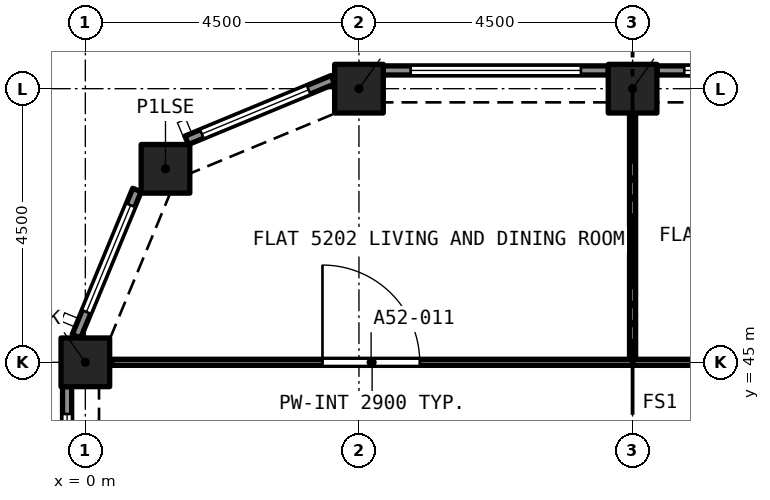
"""IFC4 building model, lengths in metres.
Left out: names, types, materials, properties, quantities, classifications, styles, units other than length and angle.
Written with IfcOpenShell. Run it as: python <this file> out.ifc"""

import sys

from ifc_helpers import new_model, si_unit, direction, frame, frame_2d, origin, origin_2d, place, context, subcontext, project, spatial, rectangle, extrude, element, fill, save


model = new_model("IFC4")
c1 = context("Model", 3, precision=1e-05, world=origin(), true_north=direction((0.0, 1.0)))
c2 = subcontext(c1, "Body", "Model", "MODEL_VIEW")
j1 = project(units=[si_unit("LENGTHUNIT", "METRE"), si_unit("PLANEANGLEUNIT", "RADIAN")], contexts=[c1])
p1 = place(None, origin())
s1 = spatial("IfcSite", under=j1, at=p1, CompositionType="ELEMENT")
p2 = place(p1, origin())
s2 = spatial("IfcBuilding", under=s1, at=p2, CompositionType="ELEMENT")
p3 = place(p2, frame((0.0, 0.0, 189.1)))
s3 = spatial("IfcBuildingStorey", under=s2, at=p3, CompositionType="ELEMENT", Elevation=189.1)
for number, where, z_axis, x_axis in (
    (1, (0.0, 45.0, 0.0), (0.0, 0.0, 1.0), (1.0, 0.0, 0.0)),
    (2, (1.318, 48.182, 0.0), (0.0, 0.0, 1.0), (1.0, 0.0, 0.0)),
    (3, (4.5, 49.5, 0.0), (0.0, 0.0, 1.0), (1.0, 0.0, 0.0)),
    (4, (9.0, 49.5, 0.0), (0.0, 0.0, 1.0), (1.0, 0.0, 0.0)),
):
    element("IfcColumn", number, at=place(p3, frame(where, z_axis=z_axis, x_axis=x_axis)), inside=s3, PredefinedType="COLUMN", context=c2, shape_type="SweptSolid", body=[
        extrude(rectangle(XDim=0.8, YDim=0.8, at=origin_2d()), origin(), (0.0, 0.0, 1.0), 3.2),
    ])
p4 = place(p3, frame((9.4, 49.8, 0.0), z_axis=(0.0, 0.0, 1.0), x_axis=(1.0, 0.0, 0.0)))
e5 = element("IfcWall", 5, at=p4, inside=s3, PredefinedType="SOLIDWALL", context=c2, shape_type="SweptSolid", body=[
    extrude(rectangle(XDim=3.7, YDim=0.15, at=frame_2d((1.85, 0.0))), origin(), (0.0, 0.0, 1.0), 3.2),
])
p5 = place(p4, frame((0.45, 0.0, 0.45)))
e6 = element("IfcOpeningElement", 6, at=p5, cuts=e5, PredefinedType="OPENING", context=c2, shape_type="SweptSolid", body=[
    extrude(rectangle(XDim=2.8, YDim=1.95, at=frame_2d((1.4, 0.975))), frame((0.0, 0.085, 0.0), z_axis=(0.0, -1.0, 0.0), x_axis=(1.0, 0.0, 0.0)), (0.0, 0.0, 1.0), 0.17),
])
p6 = place(p3, frame((4.9, 49.8, 0.0), z_axis=(0.0, 0.0, 1.0), x_axis=(1.0, 0.0, 0.0)))
e7 = element("IfcWall", 7, at=p6, inside=s3, PredefinedType="SOLIDWALL", context=c2, shape_type="SweptSolid", body=[
    extrude(rectangle(XDim=3.7, YDim=0.15, at=frame_2d((1.85, 0.0))), origin(), (0.0, 0.0, 1.0), 3.2),
])
p7 = place(p6, frame((0.45, 0.0, 0.45)))
e8 = element("IfcOpeningElement", 8, at=p7, cuts=e7, PredefinedType="OPENING", context=c2, shape_type="SweptSolid", body=[
    extrude(rectangle(XDim=2.8, YDim=1.95, at=frame_2d((1.4, 0.975))), frame((0.0, 0.085, 0.0), z_axis=(0.0, -1.0, 0.0), x_axis=(1.0, 0.0, 0.0)), (0.0, 0.0, 1.0), 0.17),
])
p8 = place(p3, frame((1.667, 48.651, 0.0), z_axis=(0.0, 0.0, 1.0), x_axis=(0.923885342263, 0.382669406082, 0.0)))
e9 = element("IfcWall", 9, at=p8, inside=s3, PredefinedType="SOLIDWALL", context=c2, shape_type="SweptSolid", body=[
    extrude(rectangle(XDim=2.602, YDim=0.15, at=frame_2d((1.301, 0.0))), origin(), (0.0, 0.0, 1.0), 3.2),
])
p9 = place(p8, frame((0.27, 0.0, 0.45)))
e10 = element("IfcOpeningElement", 10, at=p9, cuts=e9, PredefinedType="OPENING", context=c2, shape_type="SweptSolid", body=[
    extrude(rectangle(XDim=1.9, YDim=1.95, at=frame_2d((0.95, 0.975))), frame((0.0, 0.085, 0.0), z_axis=(0.0, -1.0, 0.0), x_axis=(1.0, 0.0, 0.0)), (0.0, 0.0, 1.0), 0.17),
])
p10 = place(p3, frame((-0.147, 45.429, 0.0), z_axis=(0.0, 0.0, 1.0), x_axis=(0.382669406082, 0.923885342263, 0.0)))
e11 = element("IfcWall", 11, at=p10, inside=s3, PredefinedType="SOLIDWALL", context=c2, shape_type="SweptSolid", body=[
    extrude(rectangle(XDim=2.602, YDim=0.15, at=frame_2d((1.301, 0.0))), origin(), (0.0, 0.0, 1.0), 3.2),
])
p11 = place(p10, frame((0.432, 0.0, 0.45)))
e12 = element("IfcOpeningElement", 12, at=p11, cuts=e11, PredefinedType="OPENING", context=c2, shape_type="SweptSolid", body=[
    extrude(rectangle(XDim=1.9, YDim=1.95, at=frame_2d((0.95, 0.975))), frame((0.0, 0.085, 0.0), z_axis=(0.0, -1.0, 0.0), x_axis=(1.0, 0.0, 0.0)), (0.0, 0.0, 1.0), 0.17),
])
p12 = place(p3, frame((-0.3, 40.9, 0.0), z_axis=(0.0, 0.0, 1.0), x_axis=(0.0, 1.0, 0.0)))
e13 = element("IfcWall", 13, at=p12, inside=s3, PredefinedType="SOLIDWALL", context=c2, shape_type="SweptSolid", body=[
    extrude(rectangle(XDim=3.7, YDim=0.15, at=frame_2d((1.85, 0.0))), origin(), (0.0, 0.0, 1.0), 3.2),
])
p13 = place(p12, frame((0.45, 0.0, 0.45)))
e14 = element("IfcOpeningElement", 14, at=p13, cuts=e13, PredefinedType="OPENING", context=c2, shape_type="SweptSolid", body=[
    extrude(rectangle(XDim=2.8, YDim=1.95, at=frame_2d((1.4, 0.975))), frame((0.0, 0.085, 0.0), z_axis=(0.0, -1.0, 0.0), x_axis=(1.0, 0.0, 0.0)), (0.0, 0.0, 1.0), 0.17),
])
p14 = place(p3, frame((9.0, 45.0, 0.0), z_axis=(0.0, 0.0, 1.0), x_axis=(1.0, 0.0, 0.0)))
e15 = element("IfcWall", 15, at=p14, inside=s3, PredefinedType="PARTITIONING", context=c2, shape_type="SweptSolid", body=[
    extrude(rectangle(XDim=4.5, YDim=0.1, at=frame_2d((2.25, 0.0))), origin(), (0.0, 0.0, 1.0), 2.9),
])
p15 = place(p14, frame((1.8, 0.0, 0.0)))
e16 = element("IfcOpeningElement", 16, at=p15, cuts=e15, PredefinedType="OPENING", context=c2, shape_type="SweptSolid", body=[
    extrude(rectangle(XDim=0.9, YDim=2.1, at=frame_2d((0.45, 1.05))), frame((0.0, 0.06, 0.0), z_axis=(0.0, -1.0, 0.0), x_axis=(1.0, 0.0, 0.0)), (0.0, 0.0, 1.0), 0.12),
])
p16 = place(p3, frame((9.0, 45.05, 0.0), z_axis=(0.0, 0.0, 1.0), x_axis=(0.0, 1.0, 0.0)))
e17 = element("IfcWall", 17, at=p16, inside=s3, PredefinedType="PARTITIONING", context=c2, shape_type="SweptSolid", body=[
    extrude(rectangle(XDim=4.05, YDim=0.1, at=frame_2d((2.025, 0.0))), origin(), (0.0, 0.0, 1.0), 2.9),
])
p17 = place(p3, frame((0.433, 45.0, 0.0), z_axis=(0.0, 0.0, 1.0), x_axis=(1.0, 0.0, 0.0)))
e18 = element("IfcWall", 18, at=p17, inside=s3, PredefinedType="PARTITIONING", context=c2, shape_type="SweptSolid", body=[
    extrude(rectangle(XDim=8.567, YDim=0.1, at=frame_2d((4.284, 0.0))), origin(), (0.0, 0.0, 1.0), 2.9),
])
p18 = place(p17, frame((3.467, 0.0, 0.0)))
e19 = element("IfcOpeningElement", 19, at=p18, cuts=e18, PredefinedType="OPENING", context=c2, shape_type="SweptSolid", body=[
    extrude(rectangle(XDim=1.6, YDim=2.1, at=frame_2d((0.8, 1.05))), frame((0.0, 0.06, 0.0), z_axis=(0.0, -1.0, 0.0), x_axis=(1.0, 0.0, 0.0)), (0.0, 0.0, 1.0), 0.12),
])
p19 = place(p5, origin())
e20 = element("IfcWindow", 20, at=p19, inside=s3, PartitioningType="SINGLE_PANEL", PredefinedType="WINDOW", context=c2, shape_type="SweptSolid", body=[
    extrude(rectangle(XDim=2.8, YDim=1.95, at=frame_2d((1.4, 0.975))), frame((0.0, 0.03, 0.0), z_axis=(0.0, -1.0, 0.0), x_axis=(1.0, 0.0, 0.0)), (0.0, 0.0, 1.0), 0.06),
])
fill(e6, e20)
p20 = place(p7, origin())
e21 = element("IfcWindow", 21, at=p20, inside=s3, PartitioningType="SINGLE_PANEL", PredefinedType="WINDOW", context=c2, shape_type="SweptSolid", body=[
    extrude(rectangle(XDim=2.8, YDim=1.95, at=frame_2d((1.4, 0.975))), frame((0.0, 0.03, 0.0), z_axis=(0.0, -1.0, 0.0), x_axis=(1.0, 0.0, 0.0)), (0.0, 0.0, 1.0), 0.06),
])
fill(e8, e21)
p21 = place(p9, origin())
e22 = element("IfcWindow", 22, at=p21, inside=s3, PartitioningType="SINGLE_PANEL", PredefinedType="WINDOW", context=c2, shape_type="SweptSolid", body=[
    extrude(rectangle(XDim=1.9, YDim=1.95, at=frame_2d((0.95, 0.975))), frame((0.0, 0.03, 0.0), z_axis=(0.0, -1.0, 0.0), x_axis=(1.0, 0.0, 0.0)), (0.0, 0.0, 1.0), 0.06),
])
fill(e10, e22)
p22 = place(p11, origin())
e23 = element("IfcWindow", 23, at=p22, inside=s3, PartitioningType="SINGLE_PANEL", PredefinedType="WINDOW", context=c2, shape_type="SweptSolid", body=[
    extrude(rectangle(XDim=1.9, YDim=1.95, at=frame_2d((0.95, 0.975))), frame((0.0, 0.03, 0.0), z_axis=(0.0, -1.0, 0.0), x_axis=(1.0, 0.0, 0.0)), (0.0, 0.0, 1.0), 0.06),
])
fill(e12, e23)
p23 = place(p13, origin())
e24 = element("IfcWindow", 24, at=p23, inside=s3, PartitioningType="SINGLE_PANEL", PredefinedType="WINDOW", context=c2, shape_type="SweptSolid", body=[
    extrude(rectangle(XDim=2.8, YDim=1.95, at=frame_2d((1.4, 0.975))), frame((0.0, 0.03, 0.0), z_axis=(0.0, -1.0, 0.0), x_axis=(1.0, 0.0, 0.0)), (0.0, 0.0, 1.0), 0.06),
])
fill(e14, e24)
p24 = place(p18, origin())
e25 = element("IfcDoor", 25, at=p24, inside=s3, OperationType="SINGLE_SWING_LEFT", PredefinedType="DOOR", context=c2, shape_type="SweptSolid", body=[
    extrude(rectangle(XDim=1.6, YDim=2.1, at=frame_2d((0.8, 1.05))), frame((0.0, 0.025, 0.0), z_axis=(0.0, -1.0, 0.0), x_axis=(1.0, 0.0, 0.0)), (0.0, 0.0, 1.0), 0.05),
])
fill(e19, e25)
save(model, sys.argv[1])
